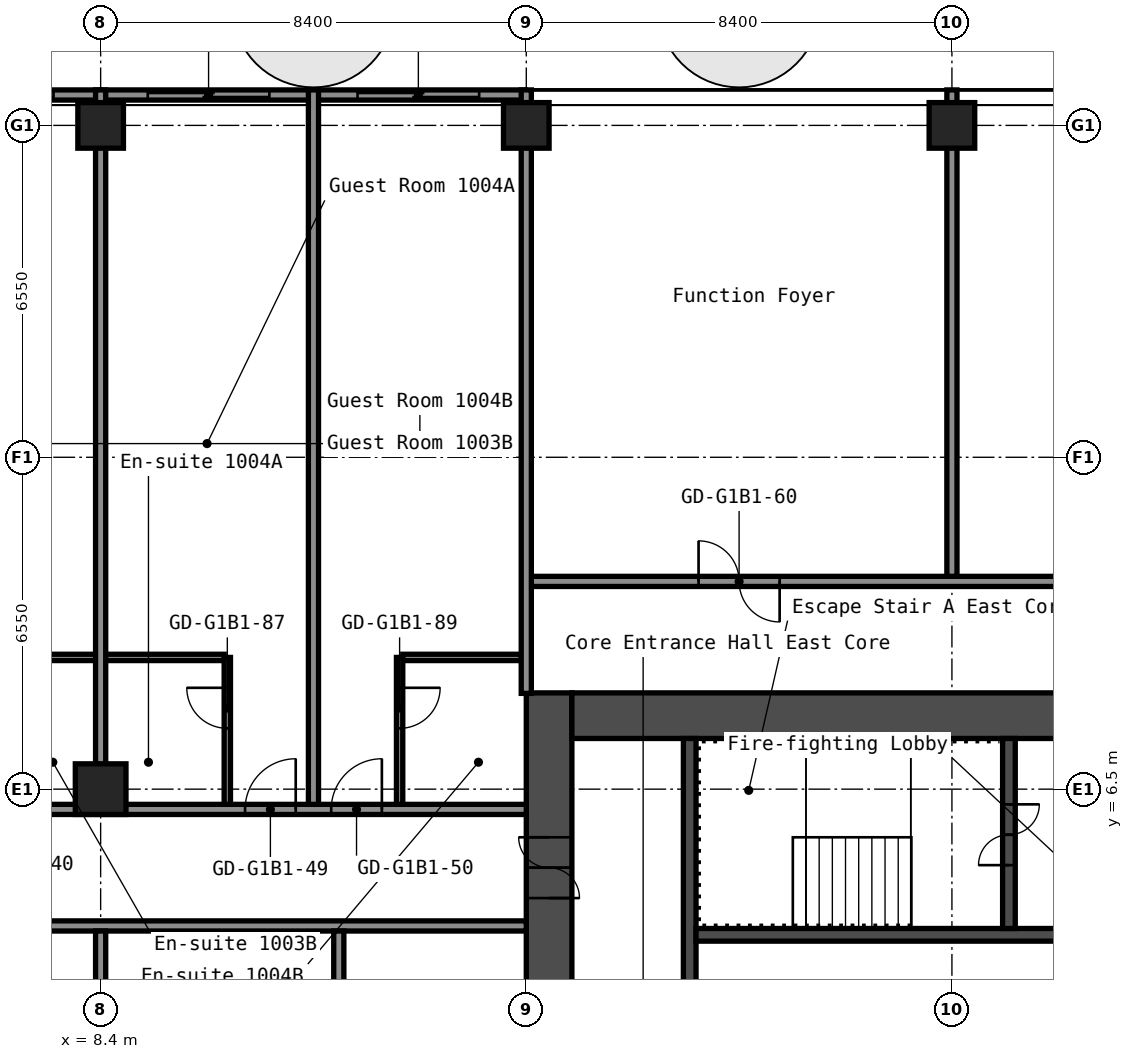
"""IFC4 building model, lengths in metres.
Left out: names, types, materials, properties, quantities, classifications, styles, units other than length and angle.
Written with IfcOpenShell. Run it as: python <this file> out.ifc"""

import sys

from ifc_helpers import new_model, si_unit, direction, frame, frame_2d, origin, origin_2d, place, context, subcontext, project, spatial, rectangle, hollow_rectangle, extrude, element, fill, save


model = new_model("IFC4")
c1 = context("Model", 3, precision=1e-05, world=origin(), true_north=direction((0.0, 1.0)))
c2 = subcontext(c1, "Body", "Model", "MODEL_VIEW")
j1 = project(units=[si_unit("LENGTHUNIT", "METRE"), si_unit("PLANEANGLEUNIT", "RADIAN")], contexts=[c1])
p1 = place(None, origin())
s1 = spatial("IfcSite", under=j1, at=p1, CompositionType="ELEMENT")
p2 = place(p1, origin())
s2 = spatial("IfcBuilding", under=s1, at=p2, CompositionType="ELEMENT")
p3 = place(p2, frame((0.0, 0.0, 39.0)))
s3 = spatial("IfcBuildingStorey", under=s2, at=p3, CompositionType="ELEMENT", Elevation=39.0)
p4 = place(p3, frame((8.4, 6.5, 0.0), z_axis=(0.0, 0.0, 1.0), x_axis=(1.0, 0.0, 0.0)))
e1 = element("IfcColumn", 1, at=p4, inside=s3, PredefinedType="COLUMN", context=c2, shape_type="SweptSolid", body=[
    extrude(hollow_rectangle(XDim=1.0, YDim=1.0, WallThickness=0.04, at=origin_2d()), origin(), (0.0, 0.0, 1.0), 2.8),
])
for number, where, z_axis, x_axis in (
    (2, (8.4, 19.6, 0.0), (0.0, 0.0, 1.0), (1.0, 0.0, 0.0)),
    (3, (16.8, 19.6, 0.0), (0.0, 0.0, 1.0), (1.0, 0.0, 0.0)),
    (4, (25.2, 19.6, 0.0), (0.0, 0.0, 1.0), (1.0, 0.0, 0.0)),
):
    element("IfcColumn", number, at=place(p3, frame(where, z_axis=z_axis, x_axis=x_axis)), inside=s3, PredefinedType="COLUMN", context=c2, shape_type="SweptSolid", body=[
        extrude(hollow_rectangle(XDim=0.9, YDim=0.9, WallThickness=0.036, at=origin_2d()), origin(), (0.0, 0.0, 1.0), 2.8),
    ])
p5 = place(p3, frame((17.25, -8.4, 0.0), z_axis=(0.0, 0.0, 1.0), x_axis=(0.0, 1.0, 0.0)))
e5 = element("IfcWall", 5, at=p5, inside=s3, PredefinedType="SHEAR", context=c2, shape_type="SweptSolid", body=[
    extrude(rectangle(XDim=16.8, YDim=0.9, at=frame_2d((8.4, 0.0))), origin(), (0.0, 0.0, 1.0), 2.8),
])
p6 = place(p5, frame((12.75, 0.0, 0.0)))
e6 = element("IfcOpeningElement", 6, at=p6, cuts=e5, PredefinedType="OPENING", context=c2, shape_type="SweptSolid", body=[
    extrude(rectangle(XDim=1.2, YDim=2.1, at=frame_2d((0.6, 1.05))), frame((0.0, 0.46, 0.0), z_axis=(0.0, -1.0, 0.0), x_axis=(1.0, 0.0, 0.0)), (0.0, 0.0, 1.0), 0.92),
])
p7 = place(p5, frame((2.85, 0.0, 0.0)))
e7 = element("IfcOpeningElement", 7, at=p7, cuts=e5, PredefinedType="OPENING", context=c2, shape_type="SweptSolid", body=[
    extrude(rectangle(XDim=1.2, YDim=2.1, at=frame_2d((0.6, 1.05))), frame((0.0, 0.46, 0.0), z_axis=(0.0, -1.0, 0.0), x_axis=(1.0, 0.0, 0.0)), (0.0, 0.0, 1.0), 0.92),
])
p8 = place(p3, frame((17.7, 7.95, 0.0), z_axis=(0.0, 0.0, 1.0), x_axis=(1.0, 0.0, 0.0)))
e8 = element("IfcWall", 8, at=p8, inside=s3, PredefinedType="SHEAR", context=c2, shape_type="SweptSolid", body=[
    extrude(rectangle(XDim=15.0, YDim=0.9, at=frame_2d((7.5, 0.0))), origin(), (0.0, 0.0, 1.0), 2.8),
])
p9 = place(p8, frame((10.4, 0.0, 0.0)))
e9 = element("IfcOpeningElement", 9, at=p9, cuts=e8, PredefinedType="OPENING", context=c2, shape_type="SweptSolid", body=[
    extrude(rectangle(XDim=1.2, YDim=2.1, at=frame_2d((0.6, 1.05))), frame((0.0, 0.46, 0.0), z_axis=(0.0, -1.0, 0.0), x_axis=(1.0, 0.0, 0.0)), (0.0, 0.0, 1.0), 0.92),
])
p10 = place(p8, frame((13.35, 0.0, 0.0)))
e10 = element("IfcOpeningElement", 10, at=p10, cuts=e8, PredefinedType="OPENING", context=c2, shape_type="SweptSolid", body=[
    extrude(rectangle(XDim=0.9, YDim=2.1, at=frame_2d((0.45, 1.05))), frame((0.0, 0.46, 0.0), z_axis=(0.0, -1.0, 0.0), x_axis=(1.0, 0.0, 0.0)), (0.0, 0.0, 1.0), 0.92),
])
p11 = place(p3, frame((20.025, 1.2, 0.0), z_axis=(0.0, 0.0, 1.0), x_axis=(0.0, 1.0, 0.0)))
e11 = element("IfcWall", 11, at=p11, inside=s3, PredefinedType="SHEAR", context=c2, shape_type="SweptSolid", body=[
    extrude(rectangle(XDim=6.3, YDim=0.25, at=frame_2d((3.15, 0.0))), origin(), (0.0, 0.0, 1.0), 2.8),
])
p12 = place(p3, frame((20.15, 3.625, 0.0), z_axis=(0.0, 0.0, 1.0), x_axis=(1.0, 0.0, 0.0)))
e12 = element("IfcWall", 12, at=p12, inside=s3, PredefinedType="SHEAR", context=c2, shape_type="SweptSolid", body=[
    extrude(rectangle(XDim=7.5, YDim=0.25, at=frame_2d((3.75, 0.0))), origin(), (0.0, 0.0, 1.0), 2.8),
])
p13 = place(p3, frame((26.325, 3.75, 0.0), z_axis=(0.0, 0.0, 1.0), x_axis=(0.0, 1.0, 0.0)))
e13 = element("IfcWall", 13, at=p13, inside=s3, PredefinedType="SHEAR", context=c2, shape_type="SweptSolid", body=[
    extrude(rectangle(XDim=3.75, YDim=0.25, at=frame_2d((1.875, 0.0))), origin(), (0.0, 0.0, 1.0), 2.8),
])
p14 = place(p13, frame((1.25, 0.0, 0.0)))
e14 = element("IfcOpeningElement", 14, at=p14, cuts=e13, PredefinedType="OPENING", context=c2, shape_type="SweptSolid", body=[
    extrude(rectangle(XDim=1.2, YDim=2.1, at=frame_2d((0.6, 1.05))), frame((0.0, 0.135, 0.0), z_axis=(0.0, -1.0, 0.0), x_axis=(1.0, 0.0, 0.0)), (0.0, 0.0, 1.0), 0.27),
])
p15 = place(p3, frame((-16.8, 3.8, 0.0), z_axis=(0.0, 0.0, 1.0), x_axis=(1.0, 0.0, 0.0)))
e15 = element("IfcWall", 15, at=p15, inside=s3, PredefinedType="PARTITIONING", context=c2, shape_type="SweptSolid", body=[
    extrude(rectangle(XDim=33.6, YDim=0.2, at=frame_2d((16.8, 0.0))), origin(), (0.0, 0.0, 1.0), 2.8),
])
p16 = place(p15, frame((1.145, 0.0, 0.0)))
e16 = element("IfcOpeningElement", 16, at=p16, cuts=e15, PredefinedType="OPENING", context=c2, shape_type="SweptSolid", body=[
    extrude(rectangle(XDim=0.9, YDim=2.1, at=frame_2d((0.45, 1.05))), frame((0.0, 0.11, 0.0), z_axis=(0.0, -1.0, 0.0), x_axis=(1.0, 0.0, 0.0)), (0.0, 0.0, 1.0), 0.22),
])
p17 = place(p15, frame((5.345, 0.0, 0.0)))
e17 = element("IfcOpeningElement", 17, at=p17, cuts=e15, PredefinedType="OPENING", context=c2, shape_type="SweptSolid", body=[
    extrude(rectangle(XDim=0.9, YDim=2.1, at=frame_2d((0.45, 1.05))), frame((0.0, 0.11, 0.0), z_axis=(0.0, -1.0, 0.0), x_axis=(1.0, 0.0, 0.0)), (0.0, 0.0, 1.0), 0.22),
])
p18 = place(p15, frame((18.87, 0.0, 0.0)))
e18 = element("IfcOpeningElement", 18, at=p18, cuts=e15, PredefinedType="OPENING", context=c2, shape_type="SweptSolid", body=[
    extrude(rectangle(XDim=0.9, YDim=2.1, at=frame_2d((0.45, 1.05))), frame((0.0, 0.11, 0.0), z_axis=(0.0, -1.0, 0.0), x_axis=(1.0, 0.0, 0.0)), (0.0, 0.0, 1.0), 0.22),
])
p19 = place(p15, frame((23.07, 0.0, 0.0)))
e19 = element("IfcOpeningElement", 19, at=p19, cuts=e15, PredefinedType="OPENING", context=c2, shape_type="SweptSolid", body=[
    extrude(rectangle(XDim=0.9, YDim=2.1, at=frame_2d((0.45, 1.05))), frame((0.0, 0.11, 0.0), z_axis=(0.0, -1.0, 0.0), x_axis=(1.0, 0.0, 0.0)), (0.0, 0.0, 1.0), 0.22),
])
p20 = place(p3, frame((-16.8, 6.1, 0.0), z_axis=(0.0, 0.0, 1.0), x_axis=(1.0, 0.0, 0.0)))
e20 = element("IfcWall", 20, at=p20, inside=s3, PredefinedType="PARTITIONING", context=c2, shape_type="SweptSolid", body=[
    extrude(rectangle(XDim=33.6, YDim=0.2, at=frame_2d((16.8, 0.0))), origin(), (0.0, 0.0, 1.0), 2.8),
])
p21 = place(p20, frame((2.85, 0.0, 0.0)))
e21 = element("IfcOpeningElement", 21, at=p21, cuts=e20, PredefinedType="OPENING", context=c2, shape_type="SweptSolid", body=[
    extrude(rectangle(XDim=1.0, YDim=2.1, at=frame_2d((0.5, 1.05))), frame((0.0, 0.11, 0.0), z_axis=(0.0, -1.0, 0.0), x_axis=(1.0, 0.0, 0.0)), (0.0, 0.0, 1.0), 0.22),
])
p22 = place(p20, frame((4.55, 0.0, 0.0)))
e22 = element("IfcOpeningElement", 22, at=p22, cuts=e20, PredefinedType="OPENING", context=c2, shape_type="SweptSolid", body=[
    extrude(rectangle(XDim=1.0, YDim=2.1, at=frame_2d((0.5, 1.05))), frame((0.0, 0.11, 0.0), z_axis=(0.0, -1.0, 0.0), x_axis=(1.0, 0.0, 0.0)), (0.0, 0.0, 1.0), 0.22),
])
p23 = place(p20, frame((10.555, 0.0, 0.0)))
e23 = element("IfcOpeningElement", 23, at=p23, cuts=e20, PredefinedType="OPENING", context=c2, shape_type="SweptSolid", body=[
    extrude(rectangle(XDim=0.9, YDim=2.1, at=frame_2d((0.45, 1.05))), frame((0.0, 0.11, 0.0), z_axis=(0.0, -1.0, 0.0), x_axis=(1.0, 0.0, 0.0)), (0.0, 0.0, 1.0), 0.22),
])
p24 = place(p20, frame((14.755, 0.0, 0.0)))
e24 = element("IfcOpeningElement", 24, at=p24, cuts=e20, PredefinedType="OPENING", context=c2, shape_type="SweptSolid", body=[
    extrude(rectangle(XDim=0.9, YDim=2.1, at=frame_2d((0.45, 1.05))), frame((0.0, 0.11, 0.0), z_axis=(0.0, -1.0, 0.0), x_axis=(1.0, 0.0, 0.0)), (0.0, 0.0, 1.0), 0.22),
])
p25 = place(p20, frame((19.65, 0.0, 0.0)))
e25 = element("IfcOpeningElement", 25, at=p25, cuts=e20, PredefinedType="OPENING", context=c2, shape_type="SweptSolid", body=[
    extrude(rectangle(XDim=1.0, YDim=2.1, at=frame_2d((0.5, 1.05))), frame((0.0, 0.11, 0.0), z_axis=(0.0, -1.0, 0.0), x_axis=(1.0, 0.0, 0.0)), (0.0, 0.0, 1.0), 0.22),
])
p26 = place(p20, frame((21.35, 0.0, 0.0)))
e26 = element("IfcOpeningElement", 26, at=p26, cuts=e20, PredefinedType="OPENING", context=c2, shape_type="SweptSolid", body=[
    extrude(rectangle(XDim=1.0, YDim=2.1, at=frame_2d((0.5, 1.05))), frame((0.0, 0.11, 0.0), z_axis=(0.0, -1.0, 0.0), x_axis=(1.0, 0.0, 0.0)), (0.0, 0.0, 1.0), 0.22),
])
p27 = place(p20, frame((28.05, 0.0, 0.0)))
e27 = element("IfcOpeningElement", 27, at=p27, cuts=e20, PredefinedType="OPENING", context=c2, shape_type="SweptSolid", body=[
    extrude(rectangle(XDim=1.0, YDim=2.1, at=frame_2d((0.5, 1.05))), frame((0.0, 0.11, 0.0), z_axis=(0.0, -1.0, 0.0), x_axis=(1.0, 0.0, 0.0)), (0.0, 0.0, 1.0), 0.22),
])
p28 = place(p20, frame((29.75, 0.0, 0.0)))
e28 = element("IfcOpeningElement", 28, at=p28, cuts=e20, PredefinedType="OPENING", context=c2, shape_type="SweptSolid", body=[
    extrude(rectangle(XDim=1.0, YDim=2.1, at=frame_2d((0.5, 1.05))), frame((0.0, 0.11, 0.0), z_axis=(0.0, -1.0, 0.0), x_axis=(1.0, 0.0, 0.0)), (0.0, 0.0, 1.0), 0.22),
])
p29 = place(p3, frame((5.962, 9.1, 0.0), z_axis=(0.0, 0.0, 1.0), x_axis=(1.0, 0.0, 0.0)))
e29 = element("IfcWall", 29, at=p29, inside=s3, PredefinedType="PARTITIONING", context=c2, shape_type="SweptSolid", body=[
    extrude(rectangle(XDim=4.875, YDim=0.125, at=frame_2d((2.438, 0.0))), origin(), (0.0, 0.0, 1.0), 2.8),
])
p30 = place(p3, frame((14.363, 9.1, 0.0), z_axis=(0.0, 0.0, 1.0), x_axis=(1.0, 0.0, 0.0)))
e30 = element("IfcWall", 30, at=p30, inside=s3, PredefinedType="PARTITIONING", context=c2, shape_type="SweptSolid", body=[
    extrude(rectangle(XDim=2.337, YDim=0.125, at=frame_2d((1.169, 0.0))), origin(), (0.0, 0.0, 1.0), 2.8),
])
p31 = place(p3, frame((16.8, 10.6, 0.0), z_axis=(0.0, 0.0, 1.0), x_axis=(1.0, 0.0, 0.0)))
e31 = element("IfcWall", 31, at=p31, inside=s3, PredefinedType="PARTITIONING", context=c2, shape_type="SweptSolid", body=[
    extrude(rectangle(XDim=34.3, YDim=0.2, at=frame_2d((17.15, 0.0))), origin(), (0.0, 0.0, 1.0), 2.8),
])
p32 = place(p31, frame((3.4, 0.0, 0.0)))
e32 = element("IfcOpeningElement", 32, at=p32, cuts=e31, PredefinedType="OPENING", context=c2, shape_type="SweptSolid", body=[
    extrude(rectangle(XDim=1.6, YDim=2.1, at=frame_2d((0.8, 1.05))), frame((0.0, 0.11, 0.0), z_axis=(0.0, -1.0, 0.0), x_axis=(1.0, 0.0, 0.0)), (0.0, 0.0, 1.0), 0.22),
])
p33 = place(p31, frame((11.8, 0.0, 0.0)))
e33 = element("IfcOpeningElement", 33, at=p33, cuts=e31, PredefinedType="OPENING", context=c2, shape_type="SweptSolid", body=[
    extrude(rectangle(XDim=1.6, YDim=2.1, at=frame_2d((0.8, 1.05))), frame((0.0, 0.11, 0.0), z_axis=(0.0, -1.0, 0.0), x_axis=(1.0, 0.0, 0.0)), (0.0, 0.0, 1.0), 0.22),
])
p34 = place(p31, frame((20.2, 0.0, 0.0)))
e34 = element("IfcOpeningElement", 34, at=p34, cuts=e31, PredefinedType="OPENING", context=c2, shape_type="SweptSolid", body=[
    extrude(rectangle(XDim=1.6, YDim=2.1, at=frame_2d((0.8, 1.05))), frame((0.0, 0.11, 0.0), z_axis=(0.0, -1.0, 0.0), x_axis=(1.0, 0.0, 0.0)), (0.0, 0.0, 1.0), 0.22),
])
p35 = place(p31, frame((28.8, 0.0, 0.0)))
e35 = element("IfcOpeningElement", 35, at=p35, cuts=e31, PredefinedType="OPENING", context=c2, shape_type="SweptSolid", body=[
    extrude(rectangle(XDim=1.6, YDim=2.1, at=frame_2d((0.8, 1.05))), frame((0.0, 0.11, 0.0), z_axis=(0.0, -1.0, 0.0), x_axis=(1.0, 0.0, 0.0)), (0.0, 0.0, 1.0), 0.22),
])
p36 = place(p3, frame((8.4, -3.7, 0.0), z_axis=(0.0, 0.0, 1.0), x_axis=(0.0, 1.0, 0.0)))
e36 = element("IfcWall", 36, at=p36, inside=s3, PredefinedType="PARTITIONING", context=c2, shape_type="SweptSolid", body=[
    extrude(rectangle(XDim=7.4, YDim=0.2, at=frame_2d((3.7, 0.0))), origin(), (0.0, 0.0, 1.0), 2.8),
])
p37 = place(p3, frame((8.4, 6.99, 0.0), z_axis=(0.0, 0.0, 1.0), x_axis=(0.0, 1.0, 0.0)))
e37 = element("IfcWall", 37, at=p37, inside=s3, PredefinedType="PARTITIONING", context=c2, shape_type="SweptSolid", body=[
    extrude(rectangle(XDim=13.31, YDim=0.2, at=frame_2d((6.655, 0.0))), origin(), (0.0, 0.0, 1.0), 2.8),
])
p38 = place(p3, frame((10.9, 6.2, 0.0), z_axis=(0.0, 0.0, 1.0), x_axis=(0.0, 1.0, 0.0)))
e38 = element("IfcWall", 38, at=p38, inside=s3, PredefinedType="PARTITIONING", context=c2, shape_type="SweptSolid", body=[
    extrude(rectangle(XDim=2.9, YDim=0.125, at=frame_2d((1.45, 0.0))), origin(), (0.0, 0.0, 1.0), 2.8),
])
p39 = place(p38, frame((1.5, 0.0, 0.0)))
e39 = element("IfcOpeningElement", 39, at=p39, cuts=e38, PredefinedType="OPENING", context=c2, shape_type="SweptSolid", body=[
    extrude(rectangle(XDim=0.8, YDim=2.1, at=frame_2d((0.4, 1.05))), frame((0.0, 0.073, 0.0), z_axis=(0.0, -1.0, 0.0), x_axis=(1.0, 0.0, 0.0)), (0.0, 0.0, 1.0), 0.145),
])
p40 = place(p3, frame((12.6, 6.2, 0.0), z_axis=(0.0, 0.0, 1.0), x_axis=(0.0, 1.0, 0.0)))
e40 = element("IfcWall", 40, at=p40, inside=s3, PredefinedType="PARTITIONING", context=c2, shape_type="SweptSolid", body=[
    extrude(rectangle(XDim=14.1, YDim=0.2, at=frame_2d((7.05, 0.0))), origin(), (0.0, 0.0, 1.0), 2.8),
])
p41 = place(p3, frame((13.1, -3.7, 0.0), z_axis=(0.0, 0.0, 1.0), x_axis=(0.0, 1.0, 0.0)))
e41 = element("IfcWall", 41, at=p41, inside=s3, PredefinedType="PARTITIONING", context=c2, shape_type="SweptSolid", body=[
    extrude(rectangle(XDim=7.4, YDim=0.2, at=frame_2d((3.7, 0.0))), origin(), (0.0, 0.0, 1.0), 2.8),
])
p42 = place(p3, frame((14.3, 6.2, 0.0), z_axis=(0.0, 0.0, 1.0), x_axis=(0.0, 1.0, 0.0)))
e42 = element("IfcWall", 42, at=p42, inside=s3, PredefinedType="PARTITIONING", context=c2, shape_type="SweptSolid", body=[
    extrude(rectangle(XDim=2.9, YDim=0.125, at=frame_2d((1.45, 0.0))), origin(), (0.0, 0.0, 1.0), 2.8),
])
p43 = place(p42, frame((1.5, 0.0, 0.0)))
e43 = element("IfcOpeningElement", 43, at=p43, cuts=e42, PredefinedType="OPENING", context=c2, shape_type="SweptSolid", body=[
    extrude(rectangle(XDim=0.8, YDim=2.1, at=frame_2d((0.4, 1.05))), frame((0.0, 0.073, 0.0), z_axis=(0.0, -1.0, 0.0), x_axis=(1.0, 0.0, 0.0)), (0.0, 0.0, 1.0), 0.145),
])
p44 = place(p3, frame((16.8, 8.39, 0.0), z_axis=(0.0, 0.0, 1.0), x_axis=(0.0, 1.0, 0.0)))
e44 = element("IfcWall", 44, at=p44, inside=s3, PredefinedType="PARTITIONING", context=c2, shape_type="SweptSolid", body=[
    extrude(rectangle(XDim=11.91, YDim=0.2, at=frame_2d((5.955, 0.0))), origin(), (0.0, 0.0, 1.0), 2.8),
])
p45 = place(p3, frame((25.2, 10.7, 0.0), z_axis=(0.0, 0.0, 1.0), x_axis=(0.0, 1.0, 0.0)))
e45 = element("IfcWall", 45, at=p45, inside=s3, PredefinedType="PARTITIONING", context=c2, shape_type="SweptSolid", body=[
    extrude(rectangle(XDim=9.6, YDim=0.2, at=frame_2d((4.8, 0.0))), origin(), (0.0, 0.0, 1.0), 2.8),
])
p46 = place(p3, frame((16.78, 20.2, 0.0), z_axis=(0.0, 0.0, 1.0), x_axis=(-1.0, 0.0, 0.0)))
p47 = place(p46, frame((0.91, 0.0, 0.0)))
p48 = place(p47, frame((2.4, 0.0, 0.0), z_axis=(0.0, 0.0, 1.0), x_axis=(-1.0, 0.0, 0.0)))
e46 = element("IfcDoor", 46, at=p48, inside=s3, OperationType="SLIDING_TO_LEFT", PredefinedType="DOOR", context=c2, shape_type="SweptSolid", body=[
    extrude(rectangle(XDim=2.4, YDim=2.2, at=frame_2d((1.2, 1.1))), frame((0.0, 0.025, 0.0), z_axis=(0.0, -1.0, 0.0), x_axis=(1.0, 0.0, 0.0)), (0.0, 0.0, 1.0), 0.05),
])
p49 = place(p3, frame((12.64, 20.2, 0.0), z_axis=(0.0, 0.0, 1.0), x_axis=(-1.0, 0.0, 0.0)))
p50 = place(p49, frame((0.91, 0.0, 0.0)))
p51 = place(p50, frame((2.4, 0.0, 0.0), z_axis=(0.0, 0.0, 1.0), x_axis=(-1.0, 0.0, 0.0)))
e47 = element("IfcDoor", 47, at=p51, inside=s3, OperationType="SLIDING_TO_LEFT", PredefinedType="DOOR", context=c2, shape_type="SweptSolid", body=[
    extrude(rectangle(XDim=2.4, YDim=2.2, at=frame_2d((1.2, 1.1))), frame((0.0, 0.025, 0.0), z_axis=(0.0, -1.0, 0.0), x_axis=(1.0, 0.0, 0.0)), (0.0, 0.0, 1.0), 0.05),
])
p52 = place(p3, frame((8.38, 20.2, 0.0), z_axis=(0.0, 0.0, 1.0), x_axis=(-1.0, 0.0, 0.0)))
p53 = place(p52, frame((0.91, 0.0, 0.0)))
p54 = place(p53, frame((2.4, 0.0, 0.0), z_axis=(0.0, 0.0, 1.0), x_axis=(-1.0, 0.0, 0.0)))
e48 = element("IfcDoor", 48, at=p54, inside=s3, OperationType="SLIDING_TO_LEFT", PredefinedType="DOOR", context=c2, shape_type="SweptSolid", body=[
    extrude(rectangle(XDim=2.4, YDim=2.2, at=frame_2d((1.2, 1.1))), frame((0.0, 0.025, 0.0), z_axis=(0.0, -1.0, 0.0), x_axis=(1.0, 0.0, 0.0)), (0.0, 0.0, 1.0), 0.05),
])
p55 = place(p6, origin())
e49 = element("IfcDoor", 49, at=p55, inside=s3, OperationType="DOUBLE_DOOR_SINGLE_SWING", PredefinedType="DOOR", context=c2, shape_type="SweptSolid", body=[
    extrude(rectangle(XDim=1.2, YDim=2.1, at=frame_2d((0.6, 1.05))), frame((0.0, 0.025, 0.0), z_axis=(0.0, -1.0, 0.0), x_axis=(1.0, 0.0, 0.0)), (0.0, 0.0, 1.0), 0.05),
])
fill(e6, e49)
p56 = place(p14, origin())
e50 = element("IfcDoor", 50, at=p56, inside=s3, OperationType="DOUBLE_DOOR_SINGLE_SWING", PredefinedType="DOOR", context=c2, shape_type="SweptSolid", body=[
    extrude(rectangle(XDim=1.2, YDim=2.1, at=frame_2d((0.6, 1.05))), frame((0.0, 0.025, 0.0), z_axis=(0.0, -1.0, 0.0), x_axis=(1.0, 0.0, 0.0)), (0.0, 0.0, 1.0), 0.05),
])
fill(e14, e50)
p57 = place(p27, origin())
e51 = element("IfcDoor", 51, at=p57, inside=s3, OperationType="SINGLE_SWING_LEFT", PredefinedType="DOOR", context=c2, shape_type="SweptSolid", body=[
    extrude(rectangle(XDim=1.0, YDim=2.1, at=frame_2d((0.5, 1.05))), frame((0.0, 0.025, 0.0), z_axis=(0.0, -1.0, 0.0), x_axis=(1.0, 0.0, 0.0)), (0.0, 0.0, 1.0), 0.05),
])
fill(e27, e51)
p58 = place(p28, origin())
e52 = element("IfcDoor", 52, at=p58, inside=s3, OperationType="SINGLE_SWING_LEFT", PredefinedType="DOOR", context=c2, shape_type="SweptSolid", body=[
    extrude(rectangle(XDim=1.0, YDim=2.1, at=frame_2d((0.5, 1.05))), frame((0.0, 0.025, 0.0), z_axis=(0.0, -1.0, 0.0), x_axis=(1.0, 0.0, 0.0)), (0.0, 0.0, 1.0), 0.05),
])
fill(e28, e52)
p59 = place(p32, origin())
e53 = element("IfcDoor", 53, at=p59, inside=s3, OperationType="DOUBLE_DOOR_SINGLE_SWING", PredefinedType="DOOR", context=c2, shape_type="SweptSolid", body=[
    extrude(rectangle(XDim=1.6, YDim=2.1, at=frame_2d((0.8, 1.05))), frame((0.0, 0.025, 0.0), z_axis=(0.0, -1.0, 0.0), x_axis=(1.0, 0.0, 0.0)), (0.0, 0.0, 1.0), 0.05),
])
fill(e32, e53)
p60 = place(p39, origin())
e54 = element("IfcDoor", 54, at=p60, inside=s3, OperationType="SINGLE_SWING_LEFT", PredefinedType="DOOR", context=c2, shape_type="SweptSolid", body=[
    extrude(rectangle(XDim=0.8, YDim=2.1, at=frame_2d((0.4, 1.05))), frame((0.0, 0.025, 0.0), z_axis=(0.0, -1.0, 0.0), x_axis=(1.0, 0.0, 0.0)), (0.0, 0.0, 1.0), 0.05),
])
fill(e39, e54)
p61 = place(p43, origin())
e55 = element("IfcDoor", 55, at=p61, inside=s3, OperationType="SINGLE_SWING_RIGHT", PredefinedType="DOOR", context=c2, shape_type="SweptSolid", body=[
    extrude(rectangle(XDim=0.8, YDim=2.1, at=frame_2d((0.4, 1.05))), frame((0.0, 0.025, 0.0), z_axis=(0.0, -1.0, 0.0), x_axis=(1.0, 0.0, 0.0)), (0.0, 0.0, 1.0), 0.05),
])
fill(e43, e55)
save(model, sys.argv[1])
